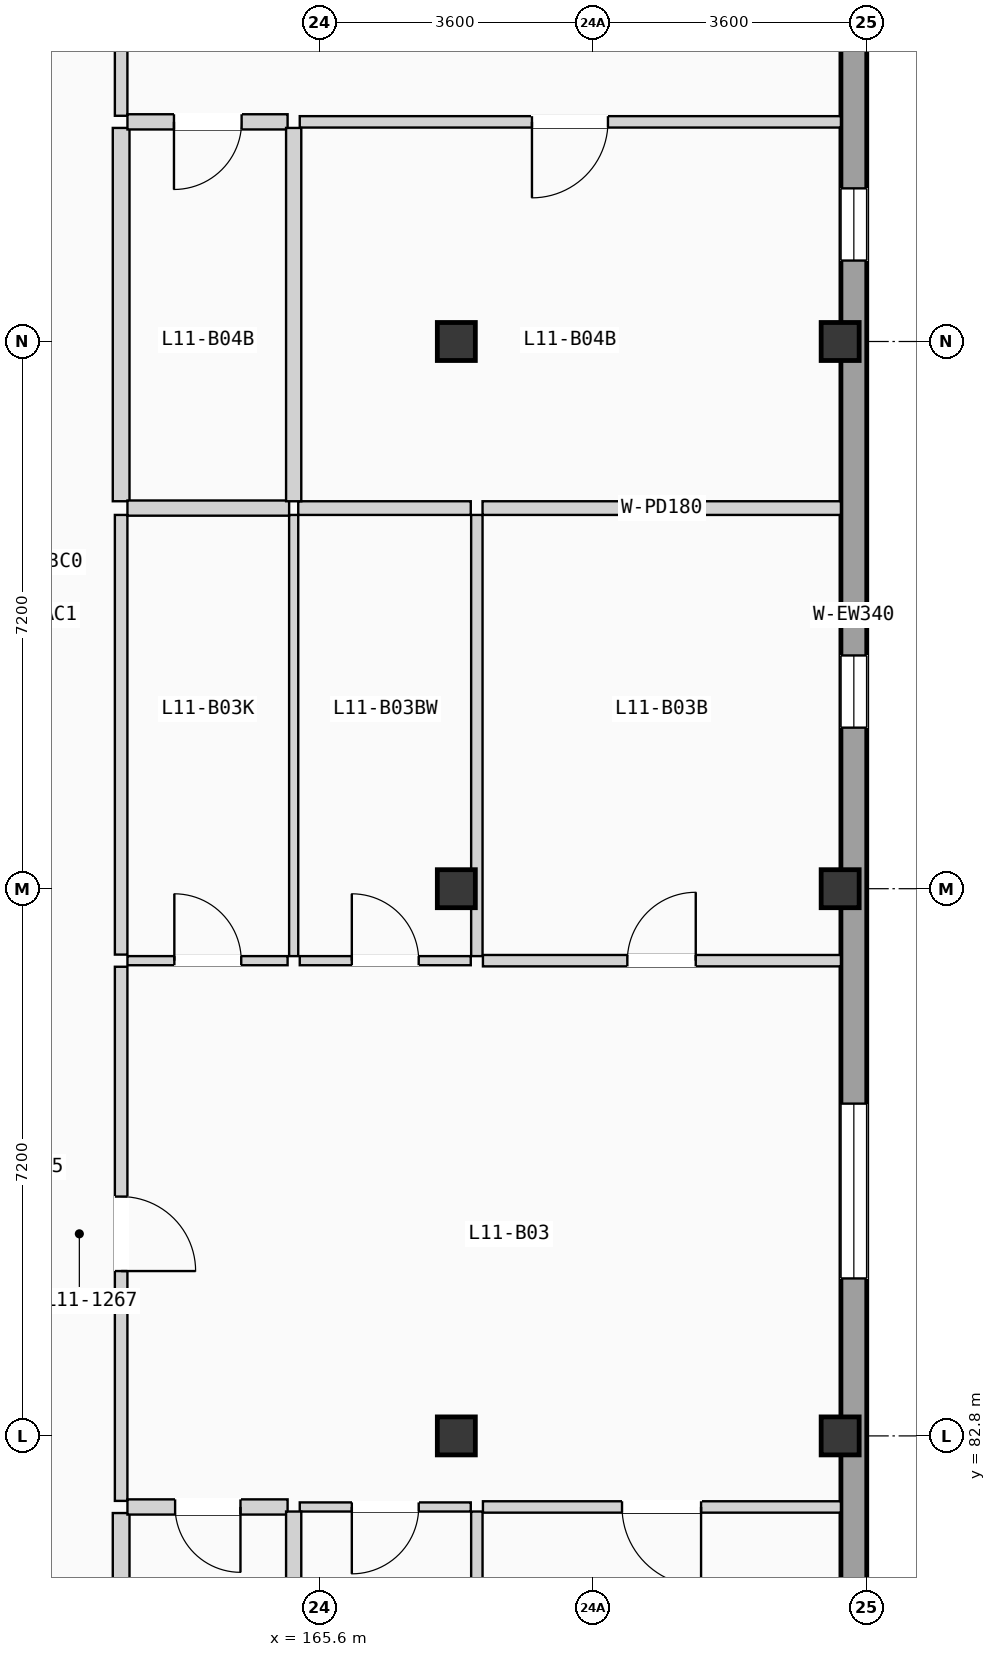
"""IFC4 building model, lengths in metres.
Left out: names, types, materials, properties, quantities, classifications, styles, units other than length and angle.
Written with IfcOpenShell. Run it as: python <this file> out.ifc"""

import sys

from ifc_helpers import new_model, si_unit, direction, frame, frame_2d, origin, origin_2d, place, context, subcontext, project, spatial, rectangle, extrude, element, fill, save


model = new_model("IFC4")
c1 = context("Model", 3, precision=1e-05, world=origin(), true_north=direction((0.0, 1.0)))
c2 = subcontext(c1, "Body", "Model", "MODEL_VIEW")
j1 = project(units=[si_unit("LENGTHUNIT", "METRE"), si_unit("PLANEANGLEUNIT", "RADIAN")], contexts=[c1])
p1 = place(None, origin())
s1 = spatial("IfcSite", under=j1, at=p1, CompositionType="ELEMENT")
p2 = place(p1, origin())
s2 = spatial("IfcBuilding", under=s1, at=p2, CompositionType="ELEMENT")
p3 = place(p2, frame((0.0, 0.0, 37.275)))
s3 = spatial("IfcBuildingStorey", under=s2, at=p3, CompositionType="ELEMENT", Elevation=37.275)
for number, where, z_axis, x_axis in (
    (1, (167.4, 82.8, 0.0), (0.0, 0.0, 1.0), (1.0, 0.0, 0.0)),
    (2, (167.4, 90.0, 0.0), (0.0, 0.0, 1.0), (1.0, 0.0, 0.0)),
    (3, (167.4, 97.2, 0.0), (0.0, 0.0, 1.0), (1.0, 0.0, 0.0)),
    (4, (172.45, 82.8, 0.0), (0.0, 0.0, 1.0), (1.0, 0.0, 0.0)),
    (5, (172.45, 90.0, 0.0), (0.0, 0.0, 1.0), (1.0, 0.0, 0.0)),
    (6, (172.45, 97.2, 0.0), (0.0, 0.0, 1.0), (1.0, 0.0, 0.0)),
):
    element("IfcColumn", number, at=place(p3, frame(where, z_axis=z_axis, x_axis=x_axis)), inside=s3, PredefinedType="COLUMN", context=c2, shape_type="SweptSolid", body=[
        extrude(rectangle(XDim=0.5, YDim=0.5, at=origin_2d()), origin(), (0.0, 0.0, 1.0), 3.15),
    ])
p4 = place(p3, frame((172.63, 68.74, 0.0), z_axis=(0.0, 0.0, 1.0), x_axis=(0.0, 1.0, 0.0)))
e7 = element("IfcWall", 7, at=p4, inside=s3, PredefinedType="SOLIDWALL", context=c2, shape_type="SweptSolid", body=[
    extrude(rectangle(XDim=49.72, YDim=0.34, at=frame_2d((24.86, 0.0))), origin(), (0.0, 0.0, 1.0), 2.6),
])
p5 = place(p4, frame((16.132, 0.0, 0.515)))
e8 = element("IfcOpeningElement", 8, at=p5, cuts=e7, PredefinedType="OPENING", context=c2, shape_type="SweptSolid", body=[
    extrude(rectangle(XDim=2.3, YDim=1.65, at=frame_2d((1.15, 0.825))), frame((0.0, 0.18, 0.0), z_axis=(0.0, -1.0, 0.0), x_axis=(1.0, 0.0, 0.0)), (0.0, 0.0, 1.0), 0.36),
])
p6 = place(p4, frame((9.678, 0.0, 0.85)))
e9 = element("IfcOpeningElement", 9, at=p6, cuts=e7, PredefinedType="OPENING", context=c2, shape_type="SweptSolid", body=[
    extrude(rectangle(XDim=0.95, YDim=1.2, at=frame_2d((0.475, 0.6))), frame((0.0, 0.18, 0.0), z_axis=(0.0, -1.0, 0.0), x_axis=(1.0, 0.0, 0.0)), (0.0, 0.0, 1.0), 0.36),
])
p7 = place(p4, frame((23.379, 0.0, 0.9)))
e10 = element("IfcOpeningElement", 10, at=p7, cuts=e7, PredefinedType="OPENING", context=c2, shape_type="SweptSolid", body=[
    extrude(rectangle(XDim=0.95, YDim=1.2, at=frame_2d((0.475, 0.6))), frame((0.0, 0.18, 0.0), z_axis=(0.0, -1.0, 0.0), x_axis=(1.0, 0.0, 0.0)), (0.0, 0.0, 1.0), 0.36),
])
p8 = place(p4, frame((32.935, 0.0, 0.815)))
e11 = element("IfcOpeningElement", 11, at=p8, cuts=e7, PredefinedType="OPENING", context=c2, shape_type="SweptSolid", body=[
    extrude(rectangle(XDim=0.95, YDim=1.35, at=frame_2d((0.475, 0.675))), frame((0.0, 0.18, 0.0), z_axis=(0.0, -1.0, 0.0), x_axis=(1.0, 0.0, 0.0)), (0.0, 0.0, 1.0), 0.36),
])
p9 = place(p4, frame((29.525, 0.0, 0.665)))
e12 = element("IfcOpeningElement", 12, at=p9, cuts=e7, PredefinedType="OPENING", context=c2, shape_type="SweptSolid", body=[
    extrude(rectangle(XDim=0.95, YDim=1.5, at=frame_2d((0.475, 0.75))), frame((0.0, 0.18, 0.0), z_axis=(0.0, -1.0, 0.0), x_axis=(1.0, 0.0, 0.0)), (0.0, 0.0, 1.0), 0.36),
])
p10 = place(p4, frame((39.529, 0.0, 0.515)))
e13 = element("IfcOpeningElement", 13, at=p10, cuts=e7, PredefinedType="OPENING", context=c2, shape_type="SweptSolid", body=[
    extrude(rectangle(XDim=0.95, YDim=1.65, at=frame_2d((0.475, 0.825))), frame((0.0, 0.18, 0.0), z_axis=(0.0, -1.0, 0.0), x_axis=(1.0, 0.0, 0.0)), (0.0, 0.0, 1.0), 0.36),
])
p11 = place(p3, frame((162.99, 81.945, 0.0), z_axis=(0.0, 0.0, 1.0), x_axis=(0.0, 1.0, 0.0)))
e14 = element("IfcWall", 14, at=p11, inside=s3, PredefinedType="PARTITIONING", context=c2, shape_type="SweptSolid", body=[
    extrude(rectangle(XDim=7.028, YDim=0.165, at=frame_2d((3.514, 0.0))), origin(), (0.0, 0.0, 1.0), 2.87),
])
p12 = place(p11, frame((3.024, 0.0, 0.0)))
e15 = element("IfcOpeningElement", 15, at=p12, cuts=e14, PredefinedType="OPENING", context=c2, shape_type="SweptSolid", body=[
    extrude(rectangle(XDim=0.98, YDim=2.08, at=frame_2d((0.49, 1.04))), frame((0.0, 0.093, 0.0), z_axis=(0.0, -1.0, 0.0), x_axis=(1.0, 0.0, 0.0)), (0.0, 0.0, 1.0), 0.185),
])
p13 = place(p3, frame((162.99, 75.975, 0.0), z_axis=(0.0, 0.0, 1.0), x_axis=(0.0, 1.0, 0.0)))
e16 = element("IfcWall", 16, at=p13, inside=s3, PredefinedType="PLUMBINGWALL", context=c2, shape_type="SweptSolid", body=[
    extrude(rectangle(XDim=5.81, YDim=0.22, at=frame_2d((2.905, 0.0))), origin(), (0.0, 0.0, 1.0), 2.87),
])
p14 = place(p3, frame((162.99, 89.133, 0.0), z_axis=(0.0, 0.0, 1.0), x_axis=(0.0, 1.0, 0.0)))
e17 = element("IfcWall", 17, at=p14, inside=s3, PredefinedType="PARTITIONING", context=c2, shape_type="SweptSolid", body=[
    extrude(rectangle(XDim=5.785, YDim=0.165, at=frame_2d((2.893, 0.0))), origin(), (0.0, 0.0, 1.0), 2.87),
])
p15 = place(p3, frame((162.99, 100.17, 0.0), z_axis=(0.0, 0.0, 1.0), x_axis=(0.0, 1.0, 0.0)))
e18 = element("IfcWall", 18, at=p15, inside=s3, PredefinedType="PARTITIONING", context=c2, shape_type="SweptSolid", body=[
    extrude(rectangle(XDim=5.958, YDim=0.165, at=frame_2d((2.979, 0.0))), origin(), (0.0, 0.0, 1.0), 2.87),
])
p16 = place(p15, frame((2.489, 0.0, 0.0)))
e19 = element("IfcOpeningElement", 19, at=p16, cuts=e18, PredefinedType="OPENING", context=c2, shape_type="SweptSolid", body=[
    extrude(rectangle(XDim=0.98, YDim=2.08, at=frame_2d((0.49, 1.04))), frame((0.0, 0.093, 0.0), z_axis=(0.0, -1.0, 0.0), x_axis=(1.0, 0.0, 0.0)), (0.0, 0.0, 1.0), 0.185),
])
p17 = place(p3, frame((162.99, 95.098, 0.0), z_axis=(0.0, 0.0, 1.0), x_axis=(0.0, 1.0, 0.0)))
e20 = element("IfcWall", 20, at=p17, inside=s3, PredefinedType="PLUMBINGWALL", context=c2, shape_type="SweptSolid", body=[
    extrude(rectangle(XDim=4.912, YDim=0.22, at=frame_2d((2.456, 0.0))), origin(), (0.0, 0.0, 1.0), 2.87),
])
p18 = place(p3, frame((163.073, 81.865, 0.0), z_axis=(0.0, 0.0, 1.0), x_axis=(1.0, 0.0, 0.0)))
e21 = element("IfcWall", 21, at=p18, inside=s3, PredefinedType="PLUMBINGWALL", context=c2, shape_type="SweptSolid", body=[
    extrude(rectangle(XDim=2.107, YDim=0.2, at=frame_2d((1.053, 0.0))), origin(), (0.0, 0.0, 1.0), 2.87),
])
p19 = place(p18, frame((0.627, 0.0, 0.0)))
e22 = element("IfcOpeningElement", 22, at=p19, cuts=e21, PredefinedType="OPENING", context=c2, shape_type="SweptSolid", body=[
    extrude(rectangle(XDim=0.86, YDim=2.0, at=frame_2d((0.43, 1.0))), frame((0.0, 0.11, 0.0), z_axis=(0.0, -1.0, 0.0), x_axis=(1.0, 0.0, 0.0)), (0.0, 0.0, 1.0), 0.22),
])
p20 = place(p3, frame((163.073, 89.053, 0.0), z_axis=(0.0, 0.0, 1.0), x_axis=(1.0, 0.0, 0.0)))
e23 = element("IfcWall", 23, at=p20, inside=s3, PredefinedType="PARTITIONING", context=c2, shape_type="SweptSolid", body=[
    extrude(rectangle(XDim=2.107, YDim=0.12, at=frame_2d((1.053, 0.0))), origin(), (0.0, 0.0, 1.0), 2.87),
])
p21 = place(p20, frame((0.617, 0.0, 0.0)))
e24 = element("IfcOpeningElement", 24, at=p21, cuts=e23, PredefinedType="OPENING", context=c2, shape_type="SweptSolid", body=[
    extrude(rectangle(XDim=0.88, YDim=2.02, at=frame_2d((0.44, 1.01))), frame((0.0, 0.07, 0.0), z_axis=(0.0, -1.0, 0.0), x_axis=(1.0, 0.0, 0.0)), (0.0, 0.0, 1.0), 0.14),
])
p22 = place(p3, frame((167.75, 81.865, 0.0), z_axis=(0.0, 0.0, 1.0), x_axis=(1.0, 0.0, 0.0)))
e25 = element("IfcWall", 25, at=p22, inside=s3, PredefinedType="PARTITIONING", context=c2, shape_type="SweptSolid", body=[
    extrude(rectangle(XDim=4.71, YDim=0.15, at=frame_2d((2.355, 0.0))), origin(), (0.0, 0.0, 1.0), 2.87),
])
p23 = place(p22, frame((1.83, 0.0, 0.0)))
e26 = element("IfcOpeningElement", 26, at=p23, cuts=e25, PredefinedType="OPENING", context=c2, shape_type="SweptSolid", body=[
    extrude(rectangle(XDim=1.04, YDim=2.08, at=frame_2d((0.52, 1.04))), frame((0.0, 0.085, 0.0), z_axis=(0.0, -1.0, 0.0), x_axis=(1.0, 0.0, 0.0)), (0.0, 0.0, 1.0), 0.17),
])
p24 = place(p3, frame((165.34, 81.865, 0.0), z_axis=(0.0, 0.0, 1.0), x_axis=(1.0, 0.0, 0.0)))
e27 = element("IfcWall", 27, at=p24, inside=s3, PredefinedType="PARTITIONING", context=c2, shape_type="SweptSolid", body=[
    extrude(rectangle(XDim=2.25, YDim=0.12, at=frame_2d((1.125, 0.0))), origin(), (0.0, 0.0, 1.0), 2.87),
])
p25 = place(p24, frame((0.685, 0.0, 0.0)))
e28 = element("IfcOpeningElement", 28, at=p25, cuts=e27, PredefinedType="OPENING", context=c2, shape_type="SweptSolid", body=[
    extrude(rectangle(XDim=0.88, YDim=2.02, at=frame_2d((0.44, 1.01))), frame((0.0, 0.07, 0.0), z_axis=(0.0, -1.0, 0.0), x_axis=(1.0, 0.0, 0.0)), (0.0, 0.0, 1.0), 0.14),
])
p26 = place(p3, frame((167.75, 89.053, 0.0), z_axis=(0.0, 0.0, 1.0), x_axis=(1.0, 0.0, 0.0)))
e29 = element("IfcWall", 29, at=p26, inside=s3, PredefinedType="PARTITIONING", context=c2, shape_type="SweptSolid", body=[
    extrude(rectangle(XDim=4.71, YDim=0.15, at=frame_2d((2.355, 0.0))), origin(), (0.0, 0.0, 1.0), 2.87),
])
p27 = place(p26, frame((1.9, 0.0, 0.0)))
e30 = element("IfcOpeningElement", 30, at=p27, cuts=e29, PredefinedType="OPENING", context=c2, shape_type="SweptSolid", body=[
    extrude(rectangle(XDim=0.9, YDim=2.04, at=frame_2d((0.45, 1.02))), frame((0.0, 0.085, 0.0), z_axis=(0.0, -1.0, 0.0), x_axis=(1.0, 0.0, 0.0)), (0.0, 0.0, 1.0), 0.17),
])
p28 = place(p3, frame((165.34, 89.053, 0.0), z_axis=(0.0, 0.0, 1.0), x_axis=(1.0, 0.0, 0.0)))
e31 = element("IfcWall", 31, at=p28, inside=s3, PredefinedType="PARTITIONING", context=c2, shape_type="SweptSolid", body=[
    extrude(rectangle(XDim=2.25, YDim=0.12, at=frame_2d((1.125, 0.0))), origin(), (0.0, 0.0, 1.0), 2.87),
])
p29 = place(p28, frame((0.685, 0.0, 0.0)))
e32 = element("IfcOpeningElement", 32, at=p29, cuts=e31, PredefinedType="OPENING", context=c2, shape_type="SweptSolid", body=[
    extrude(rectangle(XDim=0.88, YDim=2.02, at=frame_2d((0.44, 1.01))), frame((0.0, 0.07, 0.0), z_axis=(0.0, -1.0, 0.0), x_axis=(1.0, 0.0, 0.0)), (0.0, 0.0, 1.0), 0.14),
])
p30 = place(p3, frame((165.26, 75.975, 0.0), z_axis=(0.0, 0.0, 1.0), x_axis=(0.0, 1.0, 0.0)))
e33 = element("IfcWall", 33, at=p30, inside=s3, PredefinedType="PLUMBINGWALL", context=c2, shape_type="SweptSolid", body=[
    extrude(rectangle(XDim=5.83, YDim=0.2, at=frame_2d((2.915, 0.0))), origin(), (0.0, 0.0, 1.0), 2.87),
])
p31 = place(p30, frame((2.493, 0.0, 0.0)))
e34 = element("IfcOpeningElement", 34, at=p31, cuts=e33, PredefinedType="OPENING", context=c2, shape_type="SweptSolid", body=[
    extrude(rectangle(XDim=0.85, YDim=2.01, at=frame_2d((0.425, 1.005))), frame((0.0, 0.11, 0.0), z_axis=(0.0, -1.0, 0.0), x_axis=(1.0, 0.0, 0.0)), (0.0, 0.0, 1.0), 0.22),
])
p32 = place(p3, frame((165.26, 89.113, 0.0), z_axis=(0.0, 0.0, 1.0), x_axis=(0.0, 1.0, 0.0)))
e35 = element("IfcWall", 35, at=p32, inside=s3, PredefinedType="PARTITIONING", context=c2, shape_type="SweptSolid", body=[
    extrude(rectangle(XDim=5.805, YDim=0.12, at=frame_2d((2.902, 0.0))), origin(), (0.0, 0.0, 1.0), 2.87),
])
p33 = place(p3, frame((163.073, 95.008, 0.0), z_axis=(0.0, 0.0, 1.0), x_axis=(1.0, 0.0, 0.0)))
e36 = element("IfcWall", 36, at=p33, inside=s3, PredefinedType="PLUMBINGWALL", context=c2, shape_type="SweptSolid", body=[
    extrude(rectangle(XDim=2.127, YDim=0.2, at=frame_2d((1.063, 0.0))), origin(), (0.0, 0.0, 1.0), 2.87),
])
for number, where, z_axis, x_axis in (
    (37, (167.67, 76.0, 0.0), (0.0, 0.0, 1.0), (0.0, 1.0, 0.0)),
    (38, (167.67, 89.113, 0.0), (0.0, 0.0, 1.0), (0.0, 1.0, 0.0)),
):
    element("IfcWall", number, at=place(p3, frame(where, z_axis=z_axis, x_axis=x_axis)), inside=s3, PredefinedType="PARTITIONING", context=c2, shape_type="SweptSolid", body=[
        extrude(rectangle(XDim=5.805, YDim=0.15, at=frame_2d((2.902, 0.0))), origin(), (0.0, 0.0, 1.0), 2.87),
    ])
p34 = place(p3, frame((167.745, 95.008, 0.0), z_axis=(0.0, 0.0, 1.0), x_axis=(1.0, 0.0, 0.0)))
e39 = element("IfcWall", 39, at=p34, inside=s3, PredefinedType="PARTITIONING", context=c2, shape_type="SweptSolid", body=[
    extrude(rectangle(XDim=4.715, YDim=0.18, at=frame_2d((2.357, 0.0))), origin(), (0.0, 0.0, 1.0), 2.87),
])
p35 = place(p3, frame((165.32, 95.008, 0.0), z_axis=(0.0, 0.0, 1.0), x_axis=(1.0, 0.0, 0.0)))
e40 = element("IfcWall", 40, at=p35, inside=s3, PredefinedType="PARTITIONING", context=c2, shape_type="SweptSolid", body=[
    extrude(rectangle(XDim=2.27, YDim=0.18, at=frame_2d((1.135, 0.0))), origin(), (0.0, 0.0, 1.0), 2.87),
])
p36 = place(p3, frame((163.073, 100.09, 0.0), z_axis=(0.0, 0.0, 1.0), x_axis=(1.0, 0.0, 0.0)))
e41 = element("IfcWall", 41, at=p36, inside=s3, PredefinedType="PLUMBINGWALL", context=c2, shape_type="SweptSolid", body=[
    extrude(rectangle(XDim=2.107, YDim=0.2, at=frame_2d((1.053, 0.0))), origin(), (0.0, 0.0, 1.0), 2.87),
])
p37 = place(p36, frame((0.612, 0.0, 0.0)))
e42 = element("IfcOpeningElement", 42, at=p37, cuts=e41, PredefinedType="OPENING", context=c2, shape_type="SweptSolid", body=[
    extrude(rectangle(XDim=0.89, YDim=2.03, at=frame_2d((0.445, 1.015))), frame((0.0, 0.11, 0.0), z_axis=(0.0, -1.0, 0.0), x_axis=(1.0, 0.0, 0.0)), (0.0, 0.0, 1.0), 0.22),
])
p38 = place(p3, frame((165.34, 100.09, 0.0), z_axis=(0.0, 0.0, 1.0), x_axis=(1.0, 0.0, 0.0)))
e43 = element("IfcWall", 43, at=p38, inside=s3, PredefinedType="PARTITIONING", context=c2, shape_type="SweptSolid", body=[
    extrude(rectangle(XDim=7.12, YDim=0.15, at=frame_2d((3.56, 0.0))), origin(), (0.0, 0.0, 1.0), 2.87),
])
p39 = place(p38, frame((3.055, 0.0, 0.0)))
e44 = element("IfcOpeningElement", 44, at=p39, cuts=e43, PredefinedType="OPENING", context=c2, shape_type="SweptSolid", body=[
    extrude(rectangle(XDim=1.0, YDim=2.06, at=frame_2d((0.5, 1.03))), frame((0.0, 0.085, 0.0), z_axis=(0.0, -1.0, 0.0), x_axis=(1.0, 0.0, 0.0)), (0.0, 0.0, 1.0), 0.17),
])
p40 = place(p3, frame((165.26, 95.098, 0.0), z_axis=(0.0, 0.0, 1.0), x_axis=(0.0, 1.0, 0.0)))
e45 = element("IfcWall", 45, at=p40, inside=s3, PredefinedType="PLUMBINGWALL", context=c2, shape_type="SweptSolid", body=[
    extrude(rectangle(XDim=4.912, YDim=0.2, at=frame_2d((2.456, 0.0))), origin(), (0.0, 0.0, 1.0), 2.87),
])
p41 = place(p5, origin())
e46 = element("IfcWindow", 46, at=p41, inside=s3, PartitioningType="DOUBLE_PANEL_VERTICAL", PredefinedType="WINDOW", context=c2, shape_type="SweptSolid", body=[
    extrude(rectangle(XDim=2.3, YDim=1.65, at=frame_2d((1.15, 0.825))), frame((0.0, 0.03, 0.0), z_axis=(0.0, -1.0, 0.0), x_axis=(1.0, 0.0, 0.0)), (0.0, 0.0, 1.0), 0.06),
])
fill(e8, e46)
p42 = place(p7, origin())
e47 = element("IfcWindow", 47, at=p42, inside=s3, PartitioningType="SINGLE_PANEL", PredefinedType="WINDOW", context=c2, shape_type="SweptSolid", body=[
    extrude(rectangle(XDim=0.95, YDim=1.2, at=frame_2d((0.475, 0.6))), frame((0.0, 0.03, 0.0), z_axis=(0.0, -1.0, 0.0), x_axis=(1.0, 0.0, 0.0)), (0.0, 0.0, 1.0), 0.06),
])
fill(e10, e47)
p43 = place(p9, origin())
e48 = element("IfcWindow", 48, at=p43, inside=s3, PartitioningType="SINGLE_PANEL", PredefinedType="WINDOW", context=c2, shape_type="SweptSolid", body=[
    extrude(rectangle(XDim=0.95, YDim=1.5, at=frame_2d((0.475, 0.75))), frame((0.0, 0.03, 0.0), z_axis=(0.0, -1.0, 0.0), x_axis=(1.0, 0.0, 0.0)), (0.0, 0.0, 1.0), 0.06),
])
fill(e12, e48)
p44 = place(p12, frame((0.98, 0.0, 0.0), z_axis=(0.0, 0.0, 1.0), x_axis=(-1.0, 0.0, 0.0)))
e49 = element("IfcDoor", 49, at=p44, inside=s3, OperationType="SINGLE_SWING_LEFT", PredefinedType="DOOR", context=c2, shape_type="SweptSolid", body=[
    extrude(rectangle(XDim=0.98, YDim=2.08, at=frame_2d((0.49, 1.04))), frame((0.0, 0.025, 0.0), z_axis=(0.0, -1.0, 0.0), x_axis=(1.0, 0.0, 0.0)), (0.0, 0.0, 1.0), 0.05),
])
fill(e15, e49)
p45 = place(p19, frame((0.86, 0.0, 0.0), z_axis=(0.0, 0.0, 1.0), x_axis=(-1.0, 0.0, 0.0)))
e50 = element("IfcDoor", 50, at=p45, inside=s3, OperationType="SINGLE_SWING_RIGHT", PredefinedType="DOOR", context=c2, shape_type="SweptSolid", body=[
    extrude(rectangle(XDim=0.86, YDim=2.0, at=frame_2d((0.43, 1.0))), frame((0.0, 0.025, 0.0), z_axis=(0.0, -1.0, 0.0), x_axis=(1.0, 0.0, 0.0)), (0.0, 0.0, 1.0), 0.05),
])
fill(e22, e50)
p46 = place(p21, origin())
e51 = element("IfcDoor", 51, at=p46, inside=s3, OperationType="SINGLE_SWING_LEFT", PredefinedType="DOOR", context=c2, shape_type="SweptSolid", body=[
    extrude(rectangle(XDim=0.88, YDim=2.02, at=frame_2d((0.44, 1.01))), frame((0.0, 0.025, 0.0), z_axis=(0.0, -1.0, 0.0), x_axis=(1.0, 0.0, 0.0)), (0.0, 0.0, 1.0), 0.05),
])
fill(e24, e51)
p47 = place(p23, frame((1.04, 0.0, 0.0), z_axis=(0.0, 0.0, 1.0), x_axis=(-1.0, 0.0, 0.0)))
e52 = element("IfcDoor", 52, at=p47, inside=s3, OperationType="SINGLE_SWING_RIGHT", PredefinedType="DOOR", context=c2, shape_type="SweptSolid", body=[
    extrude(rectangle(XDim=1.04, YDim=2.08, at=frame_2d((0.52, 1.04))), frame((0.0, 0.025, 0.0), z_axis=(0.0, -1.0, 0.0), x_axis=(1.0, 0.0, 0.0)), (0.0, 0.0, 1.0), 0.05),
])
fill(e26, e52)
p48 = place(p25, frame((0.88, 0.0, 0.0), z_axis=(0.0, 0.0, 1.0), x_axis=(-1.0, 0.0, 0.0)))
e53 = element("IfcDoor", 53, at=p48, inside=s3, OperationType="SINGLE_SWING_LEFT", PredefinedType="DOOR", context=c2, shape_type="SweptSolid", body=[
    extrude(rectangle(XDim=0.88, YDim=2.02, at=frame_2d((0.44, 1.01))), frame((0.0, 0.025, 0.0), z_axis=(0.0, -1.0, 0.0), x_axis=(1.0, 0.0, 0.0)), (0.0, 0.0, 1.0), 0.05),
])
fill(e28, e53)
p49 = place(p27, origin())
e54 = element("IfcDoor", 54, at=p49, inside=s3, OperationType="SINGLE_SWING_RIGHT", PredefinedType="DOOR", context=c2, shape_type="SweptSolid", body=[
    extrude(rectangle(XDim=0.9, YDim=2.04, at=frame_2d((0.45, 1.02))), frame((0.0, 0.025, 0.0), z_axis=(0.0, -1.0, 0.0), x_axis=(1.0, 0.0, 0.0)), (0.0, 0.0, 1.0), 0.05),
])
fill(e30, e54)
p50 = place(p29, origin())
e55 = element("IfcDoor", 55, at=p50, inside=s3, OperationType="SINGLE_SWING_LEFT", PredefinedType="DOOR", context=c2, shape_type="SweptSolid", body=[
    extrude(rectangle(XDim=0.88, YDim=2.02, at=frame_2d((0.44, 1.01))), frame((0.0, 0.025, 0.0), z_axis=(0.0, -1.0, 0.0), x_axis=(1.0, 0.0, 0.0)), (0.0, 0.0, 1.0), 0.05),
])
fill(e32, e55)
p51 = place(p37, frame((0.89, 0.0, 0.0), z_axis=(0.0, 0.0, 1.0), x_axis=(-1.0, 0.0, 0.0)))
e56 = element("IfcDoor", 56, at=p51, inside=s3, OperationType="SINGLE_SWING_LEFT", PredefinedType="DOOR", context=c2, shape_type="SweptSolid", body=[
    extrude(rectangle(XDim=0.89, YDim=2.03, at=frame_2d((0.445, 1.015))), frame((0.0, 0.025, 0.0), z_axis=(0.0, -1.0, 0.0), x_axis=(1.0, 0.0, 0.0)), (0.0, 0.0, 1.0), 0.05),
])
fill(e42, e56)
p52 = place(p39, frame((1.0, 0.0, 0.0), z_axis=(0.0, 0.0, 1.0), x_axis=(-1.0, 0.0, 0.0)))
e57 = element("IfcDoor", 57, at=p52, inside=s3, OperationType="SINGLE_SWING_LEFT", PredefinedType="DOOR", context=c2, shape_type="SweptSolid", body=[
    extrude(rectangle(XDim=1.0, YDim=2.06, at=frame_2d((0.5, 1.03))), frame((0.0, 0.025, 0.0), z_axis=(0.0, -1.0, 0.0), x_axis=(1.0, 0.0, 0.0)), (0.0, 0.0, 1.0), 0.05),
])
fill(e44, e57)
save(model, sys.argv[1])
